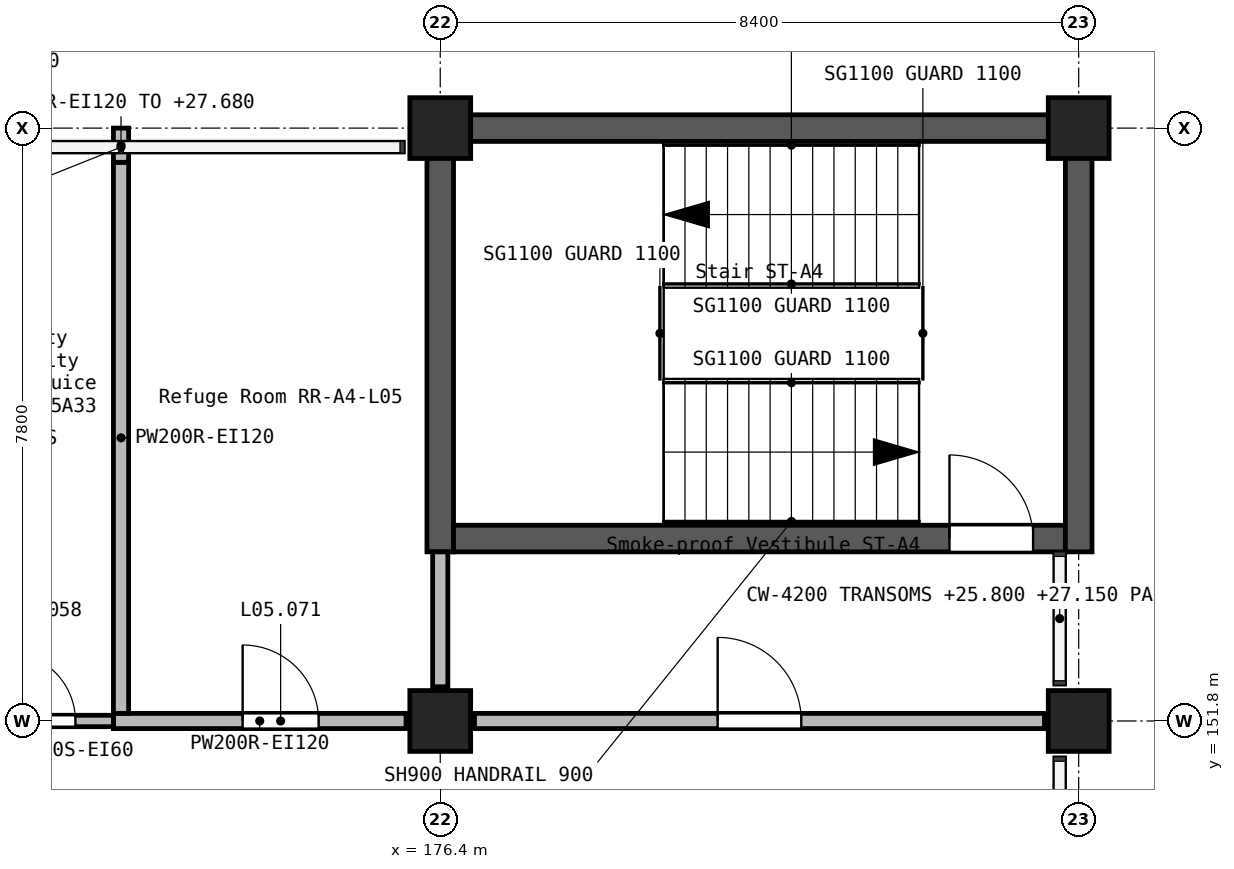
"""IFC4 building model, lengths in metres.
Left out: names, types, materials, properties, quantities, classifications, styles, units other than length and angle.
Written with IfcOpenShell. Run it as: python <this file> out.ifc"""

import sys

from ifc_helpers import new_model, si_unit, direction, frame, frame_2d, origin, origin_2d, place, context, subcontext, project, spatial, rectangle, extrude, element, fill, save


model = new_model("IFC4")
c1 = context("Model", 3, precision=1e-05, world=origin(), true_north=direction((0.0, 1.0)))
c2 = subcontext(c1, "Body", "Model", "MODEL_VIEW")
j1 = project(units=[si_unit("LENGTHUNIT", "METRE"), si_unit("PLANEANGLEUNIT", "RADIAN")], contexts=[c1])
p1 = place(None, origin())
s1 = spatial("IfcSite", under=j1, at=p1, CompositionType="ELEMENT")
p2 = place(p1, origin())
s2 = spatial("IfcBuilding", under=s1, at=p2, CompositionType="ELEMENT")
p3 = place(p2, frame((0.0, 0.0, 24.9)))
s3 = spatial("IfcBuildingStorey", under=s2, at=p3, CompositionType="ELEMENT", Elevation=24.9)
for number, where, z_axis, x_axis in (
    (1, (176.4, 151.8, 0.0), (0.0, 0.0, 1.0), (1.0, 0.0, 0.0)),
    (2, (176.4, 159.6, 0.0), (0.0, 0.0, 1.0), (1.0, 0.0, 0.0)),
    (3, (184.8, 151.8, 0.0), (0.0, 0.0, 1.0), (1.0, 0.0, 0.0)),
    (4, (184.8, 159.6, 0.0), (0.0, 0.0, 1.0), (1.0, 0.0, 0.0)),
):
    element("IfcColumn", number, at=place(p3, frame(where, z_axis=z_axis, x_axis=x_axis)), inside=s3, PredefinedType="COLUMN", context=c2, shape_type="SweptSolid", body=[
        extrude(rectangle(XDim=0.8, YDim=0.8, at=origin_2d()), origin(), (0.0, 0.0, 1.0), 3.9),
    ])
p4 = place(p3, frame((176.225, 159.6, 0.0), z_axis=(0.0, 0.0, 1.0), x_axis=(1.0, 0.0, 0.0)))
e5 = element("IfcWall", 5, at=p4, inside=s3, PredefinedType="SHEAR", context=c2, shape_type="SweptSolid", body=[
    extrude(rectangle(XDim=8.4, YDim=0.35, at=frame_2d((4.2, 0.0))), origin(), (0.0, 0.0, 1.0), 3.9),
])
p5 = place(p3, frame((176.4, 154.025, 0.0), z_axis=(0.0, 0.0, 1.0), x_axis=(0.0, 1.0, 0.0)))
e6 = element("IfcWall", 6, at=p5, inside=s3, PredefinedType="SHEAR", context=c2, shape_type="SweptSolid", body=[
    extrude(rectangle(XDim=5.4, YDim=0.35, at=frame_2d((2.7, 0.0))), origin(), (0.0, 0.0, 1.0), 3.9),
])
p6 = place(p3, frame((176.575, 154.2, 0.0), z_axis=(0.0, 0.0, 1.0), x_axis=(1.0, 0.0, 0.0)))
e7 = element("IfcWall", 7, at=p6, inside=s3, PredefinedType="SHEAR", context=c2, shape_type="SweptSolid", body=[
    extrude(rectangle(XDim=8.05, YDim=0.35, at=frame_2d((4.025, 0.0))), origin(), (0.0, 0.0, 1.0), 3.9),
])
p7 = place(p6, frame((6.525, 0.0, 0.0)))
e8 = element("IfcOpeningElement", 8, at=p7, cuts=e7, PredefinedType="OPENING", context=c2, shape_type="SweptSolid", body=[
    extrude(rectangle(XDim=1.1, YDim=2.1, at=frame_2d((0.55, 1.05))), frame((0.0, 0.185, 0.0), z_axis=(0.0, -1.0, 0.0), x_axis=(1.0, 0.0, 0.0)), (0.0, 0.0, 1.0), 0.37),
])
p8 = place(p3, frame((184.8, 154.025, 0.0), z_axis=(0.0, 0.0, 1.0), x_axis=(0.0, 1.0, 0.0)))
e9 = element("IfcWall", 9, at=p8, inside=s3, PredefinedType="SHEAR", context=c2, shape_type="SweptSolid", body=[
    extrude(rectangle(XDim=5.75, YDim=0.35, at=frame_2d((2.875, 0.0))), origin(), (0.0, 0.0, 1.0), 3.9),
])
p9 = place(p3, frame((172.1, 151.8, 0.0), z_axis=(0.0, 0.0, 1.0), x_axis=(1.0, 0.0, 0.0)))
e10 = element("IfcWall", 10, at=p9, inside=s3, PredefinedType="SOLIDWALL", context=c2, shape_type="SweptSolid", body=[
    extrude(rectangle(XDim=3.85, YDim=0.2, at=frame_2d((1.925, 0.0))), origin(), (0.0, 0.0, 1.0), 3.6),
])
p10 = place(p9, frame((1.7, 0.0, 0.0)))
e11 = element("IfcOpeningElement", 11, at=p10, cuts=e10, PredefinedType="OPENING", context=c2, shape_type="SweptSolid", body=[
    extrude(rectangle(XDim=1.0, YDim=2.1, at=frame_2d((0.5, 1.05))), frame((0.0, 0.11, 0.0), z_axis=(0.0, -1.0, 0.0), x_axis=(1.0, 0.0, 0.0)), (0.0, 0.0, 1.0), 0.22),
])
p11 = place(p3, frame((176.85, 151.8, 0.0), z_axis=(0.0, 0.0, 1.0), x_axis=(1.0, 0.0, 0.0)))
e12 = element("IfcWall", 12, at=p11, inside=s3, PredefinedType="SOLIDWALL", context=c2, shape_type="SweptSolid", body=[
    extrude(rectangle(XDim=7.5, YDim=0.2, at=frame_2d((3.75, 0.0))), origin(), (0.0, 0.0, 1.0), 3.6),
])
p12 = place(p11, frame((3.2, 0.0, 0.0)))
e13 = element("IfcOpeningElement", 13, at=p12, cuts=e12, PredefinedType="OPENING", context=c2, shape_type="SweptSolid", body=[
    extrude(rectangle(XDim=1.1, YDim=2.1, at=frame_2d((0.55, 1.05))), frame((0.0, 0.11, 0.0), z_axis=(0.0, -1.0, 0.0), x_axis=(1.0, 0.0, 0.0)), (0.0, 0.0, 1.0), 0.22),
])
p13 = place(p3, frame((176.4, 152.25, 0.0), z_axis=(0.0, 0.0, 1.0), x_axis=(0.0, 1.0, 0.0)))
e14 = element("IfcWall", 14, at=p13, inside=s3, PredefinedType="SOLIDWALL", context=c2, shape_type="SweptSolid", body=[
    extrude(rectangle(XDim=1.775, YDim=0.2, at=frame_2d((0.887, 0.0))), origin(), (0.0, 0.0, 1.0), 3.6),
])
p14 = place(p3, frame((172.2, 151.9, 0.0), z_axis=(0.0, 0.0, 1.0), x_axis=(0.0, 1.0, 0.0)))
e15 = element("IfcWall", 15, at=p14, inside=s3, PredefinedType="SOLIDWALL", context=c2, shape_type="SweptSolid", body=[
    extrude(rectangle(XDim=7.25, YDim=0.2, at=frame_2d((3.625, 0.0))), origin(), (0.0, 0.0, 1.0), 3.6),
])
p15 = place(p3, frame((172.2, 159.15, 0.0), z_axis=(0.0, 0.0, 1.0), x_axis=(0.0, 1.0, 0.0)))
e16 = element("IfcWall", 16, at=p15, inside=s3, PredefinedType="SOLIDWALL", context=c2, shape_type="SweptSolid", body=[
    extrude(rectangle(XDim=0.45, YDim=0.2, at=frame_2d((0.225, 0.0))), origin(), (0.0, 0.0, 1.0), 2.78),
])
p16 = place(p3, frame((170.175, 151.8, 0.0), z_axis=(0.0, 0.0, 1.0), x_axis=(1.0, 0.0, 0.0)))
e17 = element("IfcWall", 17, at=p16, inside=s3, PredefinedType="PARTITIONING", context=c2, shape_type="SweptSolid", body=[
    extrude(rectangle(XDim=1.925, YDim=0.15, at=frame_2d((0.962, 0.0))), origin(), (0.0, 0.0, 1.0), 3.6),
])
p17 = place(p16, frame((0.525, 0.0, 0.0)))
e18 = element("IfcOpeningElement", 18, at=p17, cuts=e17, PredefinedType="OPENING", context=c2, shape_type="SweptSolid", body=[
    extrude(rectangle(XDim=0.9, YDim=2.1, at=frame_2d((0.45, 1.05))), frame((0.0, 0.085, 0.0), z_axis=(0.0, -1.0, 0.0), x_axis=(1.0, 0.0, 0.0)), (0.0, 0.0, 1.0), 0.17),
])
p18 = place(p17, origin())
e19 = element("IfcDoor", 19, at=p18, inside=s3, OperationType="SINGLE_SWING_RIGHT", PredefinedType="DOOR", context=c2, shape_type="SweptSolid", body=[
    extrude(rectangle(XDim=0.9, YDim=2.1, at=frame_2d((0.45, 1.05))), frame((0.0, 0.025, 0.0), z_axis=(0.0, -1.0, 0.0), x_axis=(1.0, 0.0, 0.0)), (0.0, 0.0, 1.0), 0.05),
])
fill(e18, e19)
p19 = place(p10, origin())
e20 = element("IfcDoor", 20, at=p19, inside=s3, OperationType="SINGLE_SWING_RIGHT", PredefinedType="DOOR", context=c2, shape_type="SweptSolid", body=[
    extrude(rectangle(XDim=1.0, YDim=2.1, at=frame_2d((0.5, 1.05))), frame((0.0, 0.025, 0.0), z_axis=(0.0, -1.0, 0.0), x_axis=(1.0, 0.0, 0.0)), (0.0, 0.0, 1.0), 0.05),
])
fill(e11, e20)
p20 = place(p7, origin())
e21 = element("IfcDoor", 21, at=p20, inside=s3, OperationType="SINGLE_SWING_RIGHT", PredefinedType="DOOR", context=c2, shape_type="SweptSolid", body=[
    extrude(rectangle(XDim=1.1, YDim=2.1, at=frame_2d((0.55, 1.05))), frame((0.0, 0.025, 0.0), z_axis=(0.0, -1.0, 0.0), x_axis=(1.0, 0.0, 0.0)), (0.0, 0.0, 1.0), 0.05),
])
fill(e8, e21)
p21 = place(p12, origin())
e22 = element("IfcDoor", 22, at=p21, inside=s3, OperationType="SINGLE_SWING_RIGHT", PredefinedType="DOOR", context=c2, shape_type="SweptSolid", body=[
    extrude(rectangle(XDim=1.1, YDim=2.1, at=frame_2d((0.55, 1.05))), frame((0.0, 0.025, 0.0), z_axis=(0.0, -1.0, 0.0), x_axis=(1.0, 0.0, 0.0)), (0.0, 0.0, 1.0), 0.05),
])
fill(e13, e22)
save(model, sys.argv[1])
